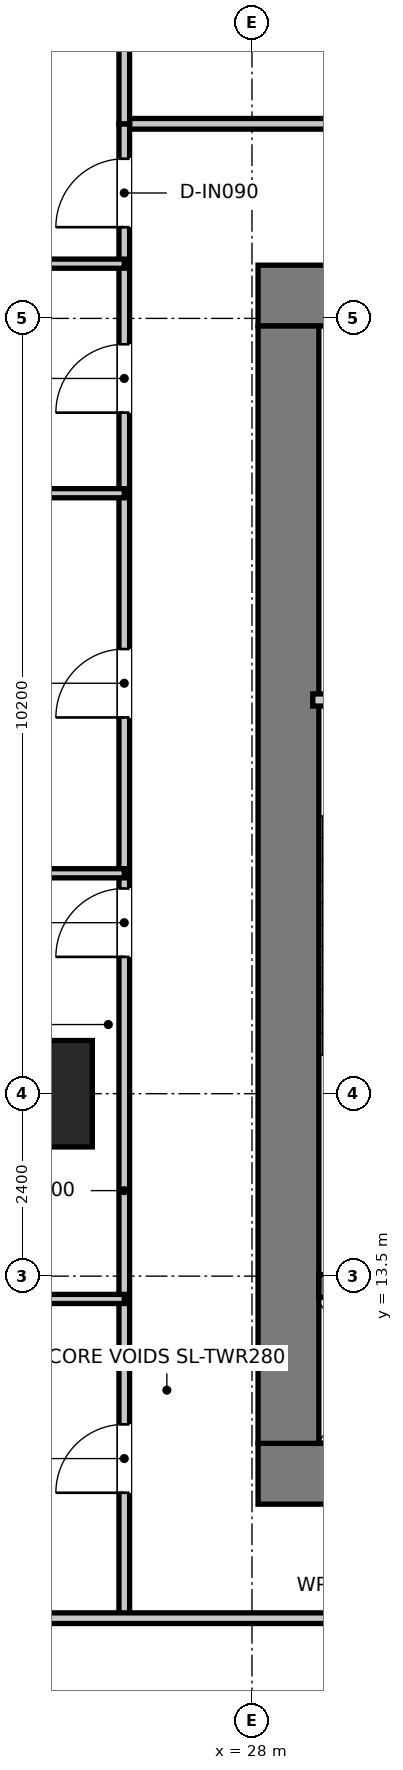
"""IFC4 building model, lengths in metres.
Left out: names, types, materials, properties, quantities, classifications, styles, units other than length and angle.
Written with IfcOpenShell. Run it as: python <this file> out.ifc"""

import sys

from ifc_helpers import new_model, si_unit, direction, frame, frame_2d, origin, origin_2d, place, context, subcontext, project, spatial, rectangle, extrude, source, transform, mapped, element, fill, save


model = new_model("IFC4")
c1 = context("Model", 3, precision=1e-05, world=origin(), true_north=direction((0.0, 1.0)))
c2 = subcontext(c1, "Body", "Model", "MODEL_VIEW")
j1 = project(units=[si_unit("LENGTHUNIT", "METRE"), si_unit("PLANEANGLEUNIT", "RADIAN")], contexts=[c1])
p1 = place(None, origin())
s1 = spatial("IfcSite", under=j1, at=p1, CompositionType="ELEMENT")
p2 = place(p1, origin())
s2 = spatial("IfcBuilding", under=s1, at=p2, CompositionType="ELEMENT")
p3 = place(p2, frame((0.0, 0.0, 295.05)))
s3 = spatial("IfcBuildingStorey", under=s2, at=p3, CompositionType="ELEMENT", Elevation=295.05)
p4 = place(p3, frame((28.08, 10.9, 0.0), z_axis=(0.0, 0.0, 1.0), x_axis=(1.0, 0.0, 0.0)))
e1 = element("IfcWall", 1, at=p4, inside=s3, PredefinedType="SHEAR", context=c2, shape_type="SweptSolid", body=[
    extrude(rectangle(XDim=15.84, YDim=0.8, at=frame_2d((7.92, 0.0))), origin(), (0.0, 0.0, 1.0), 3.95),
])
p5 = place(p3, frame((28.08, 26.4, 0.0), z_axis=(0.0, 0.0, 1.0), x_axis=(1.0, 0.0, 0.0)))
e2 = element("IfcWall", 2, at=p5, inside=s3, PredefinedType="SHEAR", context=c2, shape_type="SweptSolid", body=[
    extrude(rectangle(XDim=15.84, YDim=0.8, at=frame_2d((7.92, 0.0))), origin(), (0.0, 0.0, 1.0), 3.95),
])
p6 = place(p5, frame((7.22, 0.0, 0.0)))
e3 = element("IfcOpeningElement", 3, at=p6, cuts=e2, PredefinedType="OPENING", context=c2, shape_type="SweptSolid", body=[
    extrude(rectangle(XDim=1.4, YDim=2.2, at=frame_2d((0.7, 1.1))), frame((0.0, 0.41, 0.0), z_axis=(0.0, -1.0, 0.0), x_axis=(1.0, 0.0, 0.0)), (0.0, 0.0, 1.0), 0.82),
])
p7 = place(p5, frame((1.775, 0.0, 0.0)))
e4 = element("IfcOpeningElement", 4, at=p7, cuts=e2, PredefinedType="OPENING", context=c2, shape_type="SweptSolid", body=[
    extrude(rectangle(XDim=1.05, YDim=2.1, at=frame_2d((0.525, 1.05))), frame((0.0, 0.41, 0.0), z_axis=(0.0, -1.0, 0.0), x_axis=(1.0, 0.0, 0.0)), (0.0, 0.0, 1.0), 0.82),
])
p8 = place(p5, frame((13.015, 0.0, 0.0)))
e5 = element("IfcOpeningElement", 5, at=p8, cuts=e2, PredefinedType="OPENING", context=c2, shape_type="SweptSolid", body=[
    extrude(rectangle(XDim=1.05, YDim=2.1, at=frame_2d((0.525, 1.05))), frame((0.0, 0.41, 0.0), z_axis=(0.0, -1.0, 0.0), x_axis=(1.0, 0.0, 0.0)), (0.0, 0.0, 1.0), 0.82),
])
p9 = place(p3, frame((28.48, 11.3, 0.0), z_axis=(0.0, 0.0, 1.0), x_axis=(0.0, 1.0, 0.0)))
e6 = element("IfcWall", 6, at=p9, inside=s3, PredefinedType="SHEAR", context=c2, shape_type="SweptSolid", body=[
    extrude(rectangle(XDim=14.7, YDim=0.8, at=frame_2d((7.35, 0.0))), origin(), (0.0, 0.0, 1.0), 3.95),
])
p10 = place(p3, frame((28.88, 13.37, 0.0), z_axis=(0.0, 0.0, 1.0), x_axis=(1.0, 0.0, 0.0)))
e7 = element("IfcWall", 7, at=p10, inside=s3, PredefinedType="SHEAR", context=c2, shape_type="SweptSolid", body=[
    extrude(rectangle(XDim=3.1, YDim=0.3, at=frame_2d((1.55, 0.0))), origin(), (0.0, 0.0, 1.0), 3.95),
])
m1 = source(origin(), c2, "Body", "SweptSolid", [
    extrude(rectangle(XDim=1.4, YDim=1.4, at=origin_2d()), origin(), (0.0, 0.0, 1.0), 3.95),
])
p11 = place(p3, frame((25.2, 15.9, 0.0), z_axis=(0.0, 0.0, 1.0), x_axis=(1.0, 0.0, 0.0)))
e8 = element("IfcColumn", 8, at=p11, inside=s3, PredefinedType="USERDEFINED", context=c2, shape_type="MappedRepresentation", body=[
    mapped(m1, transform((0.0, 0.0, 0.0), x_axis=(1.0, 0.0, 0.0), y_axis=(0.0, 1.0, 0.0), z_axis=(0.0, 0.0, 1.0), scale=1.0)),
])
p12 = place(p3, frame((28.8, 21.08, 0.0), z_axis=(0.0, 0.0, 1.0), x_axis=(1.0, 0.0, 0.0)))
e9 = element("IfcWall", 9, at=p12, inside=s3, PredefinedType="PARTITIONING", context=c2, shape_type="SweptSolid", body=[
    extrude(rectangle(XDim=3.16, YDim=0.16, at=frame_2d((1.58, 0.0))), origin(), (0.0, 0.0, 1.0), 3.67),
])
p13 = place(p12, frame((1.055, 0.0, 0.0)))
e10 = element("IfcOpeningElement", 10, at=p13, cuts=e9, PredefinedType="OPENING", context=c2, shape_type="SweptSolid", body=[
    extrude(rectangle(XDim=1.05, YDim=2.1, at=frame_2d((0.525, 1.05))), frame((0.0, 0.09, 0.0), z_axis=(0.0, -1.0, 0.0), x_axis=(1.0, 0.0, 0.0)), (0.0, 0.0, 1.0), 0.18),
])
p14 = place(p3, frame((26.32, 28.66, 0.0), z_axis=(0.0, 0.0, 1.0), x_axis=(1.0, 0.0, 0.0)))
e11 = element("IfcWall", 11, at=p14, inside=s3, PredefinedType="PARTITIONING", context=c2, shape_type="SweptSolid", body=[
    extrude(rectangle(XDim=19.36, YDim=0.14, at=frame_2d((9.68, 0.0))), origin(), (0.0, 0.0, 1.0), 3.18),
])
p15 = place(p14, frame((4.265, 0.0, 0.0)))
e12 = element("IfcOpeningElement", 12, at=p15, cuts=e11, PredefinedType="OPENING", context=c2, shape_type="SweptSolid", body=[
    extrude(rectangle(XDim=0.95, YDim=2.1, at=frame_2d((0.475, 1.05))), frame((0.0, 0.08, 0.0), z_axis=(0.0, -1.0, 0.0), x_axis=(1.0, 0.0, 0.0)), (0.0, 0.0, 1.0), 0.16),
])
p16 = place(p14, frame((13.945, 0.0, 0.0)))
e13 = element("IfcOpeningElement", 13, at=p16, cuts=e11, PredefinedType="OPENING", context=c2, shape_type="SweptSolid", body=[
    extrude(rectangle(XDim=0.95, YDim=2.1, at=frame_2d((0.475, 1.05))), frame((0.0, 0.08, 0.0), z_axis=(0.0, -1.0, 0.0), x_axis=(1.0, 0.0, 0.0)), (0.0, 0.0, 1.0), 0.16),
])
p17 = place(p3, frame((26.32, 9.0, 0.0), z_axis=(0.0, 0.0, 1.0), x_axis=(0.0, 1.0, 0.0)))
e14 = element("IfcWall", 14, at=p17, inside=s3, PredefinedType="PARTITIONING", context=c2, shape_type="SweptSolid", body=[
    extrude(rectangle(XDim=19.66, YDim=0.14, at=frame_2d((9.83, 0.0))), origin(), (0.0, 0.0, 1.0), 3.13),
])
p18 = place(p17, frame((18.3, 0.0, 0.0)))
e15 = element("IfcOpeningElement", 15, at=p18, cuts=e14, PredefinedType="OPENING", context=c2, shape_type="SweptSolid", body=[
    extrude(rectangle(XDim=0.9, YDim=2.1, at=frame_2d((0.45, 1.05))), frame((0.0, 0.08, 0.0), z_axis=(0.0, -1.0, 0.0), x_axis=(1.0, 0.0, 0.0)), (0.0, 0.0, 1.0), 0.16),
])
p19 = place(p17, frame((1.65, 0.0, 0.0)))
e16 = element("IfcOpeningElement", 16, at=p19, cuts=e14, PredefinedType="OPENING", context=c2, shape_type="SweptSolid", body=[
    extrude(rectangle(XDim=0.9, YDim=2.1, at=frame_2d((0.45, 1.05))), frame((0.0, 0.08, 0.0), z_axis=(0.0, -1.0, 0.0), x_axis=(1.0, 0.0, 0.0)), (0.0, 0.0, 1.0), 0.16),
])
p20 = place(p17, frame((8.7, 0.0, 0.0)))
e17 = element("IfcOpeningElement", 17, at=p20, cuts=e14, PredefinedType="OPENING", context=c2, shape_type="SweptSolid", body=[
    extrude(rectangle(XDim=0.9, YDim=2.1, at=frame_2d((0.45, 1.05))), frame((0.0, 0.08, 0.0), z_axis=(0.0, -1.0, 0.0), x_axis=(1.0, 0.0, 0.0)), (0.0, 0.0, 1.0), 0.16),
])
p21 = place(p17, frame((11.85, 0.0, 0.0)))
e18 = element("IfcOpeningElement", 18, at=p21, cuts=e14, PredefinedType="OPENING", context=c2, shape_type="SweptSolid", body=[
    extrude(rectangle(XDim=0.9, YDim=2.1, at=frame_2d((0.45, 1.05))), frame((0.0, 0.08, 0.0), z_axis=(0.0, -1.0, 0.0), x_axis=(1.0, 0.0, 0.0)), (0.0, 0.0, 1.0), 0.16),
])
p22 = place(p17, frame((15.86, 0.0, 0.0)))
e19 = element("IfcOpeningElement", 19, at=p22, cuts=e14, PredefinedType="OPENING", context=c2, shape_type="SweptSolid", body=[
    extrude(rectangle(XDim=0.9, YDim=2.1, at=frame_2d((0.45, 1.05))), frame((0.0, 0.08, 0.0), z_axis=(0.0, -1.0, 0.0), x_axis=(1.0, 0.0, 0.0)), (0.0, 0.0, 1.0), 0.16),
])
p23 = place(p3, frame((23.783, 9.0, 0.0), z_axis=(0.0, 0.0, 1.0), x_axis=(1.0, 0.0, 0.0)))
e20 = element("IfcWall", 20, at=p23, inside=s3, PredefinedType="PARTITIONING", context=c2, shape_type="SweptSolid", body=[
    extrude(rectangle(XDim=20.609, YDim=0.14, at=frame_2d((10.304, 0.0))), origin(), (0.0, 0.0, 1.0), 3.67),
])
p24 = place(p23, frame((11.767, 0.0, 0.0)))
e21 = element("IfcOpeningElement", 21, at=p24, cuts=e20, PredefinedType="OPENING", context=c2, shape_type="SweptSolid", body=[
    extrude(rectangle(XDim=0.9, YDim=2.1, at=frame_2d((0.45, 1.05))), frame((0.0, 0.08, 0.0), z_axis=(0.0, -1.0, 0.0), x_axis=(1.0, 0.0, 0.0)), (0.0, 0.0, 1.0), 0.16),
])
p25 = place(p3, frame((13.286, 26.82, 0.0), z_axis=(0.0, 0.0, 1.0), x_axis=(1.0, 0.0, 0.0)))
e22 = element("IfcWall", 22, at=p25, inside=s3, PredefinedType="PARTITIONING", context=c2, shape_type="SweptSolid", body=[
    extrude(rectangle(XDim=13.034, YDim=0.12, at=frame_2d((6.517, 0.0))), origin(), (0.0, 0.0, 1.0), 3.13),
])
p26 = place(p3, frame((26.32, 28.66, 0.0), z_axis=(0.0, 0.0, 1.0), x_axis=(0.0, 1.0, 0.0)))
e23 = element("IfcWall", 23, at=p26, inside=s3, PredefinedType="PARTITIONING", context=c2, shape_type="SweptSolid", body=[
    extrude(rectangle(XDim=2.64, YDim=0.14, at=frame_2d((1.32, 0.0))), origin(), (0.0, 0.0, 1.0), 3.43),
])
p27 = place(p3, frame((21.309, 13.2, 0.0), z_axis=(0.0, 0.0, 1.0), x_axis=(1.0, 0.0, 0.0)))
e24 = element("IfcWall", 24, at=p27, inside=s3, PredefinedType="PARTITIONING", context=c2, shape_type="SweptSolid", body=[
    extrude(rectangle(XDim=5.011, YDim=0.12, at=frame_2d((2.505, 0.0))), origin(), (0.0, 0.0, 1.0), 3.18),
])
p28 = place(p3, frame((18.01, 18.8, 0.0), z_axis=(0.0, 0.0, 1.0), x_axis=(1.0, 0.0, 0.0)))
e25 = element("IfcWall", 25, at=p28, inside=s3, PredefinedType="PARTITIONING", context=c2, shape_type="SweptSolid", body=[
    extrude(rectangle(XDim=8.31, YDim=0.12, at=frame_2d((4.155, 0.0))), origin(), (0.0, 0.0, 1.0), 3.13),
])
p29 = place(p3, frame((15.065, 23.8, 0.0), z_axis=(0.0, 0.0, 1.0), x_axis=(1.0, 0.0, 0.0)))
e26 = element("IfcWall", 26, at=p29, inside=s3, PredefinedType="PARTITIONING", context=c2, shape_type="SweptSolid", body=[
    extrude(rectangle(XDim=11.255, YDim=0.12, at=frame_2d((5.627, 0.0))), origin(), (0.0, 0.0, 1.0), 3.13),
])
p30 = place(p18, origin())
e27 = element("IfcDoor", 27, at=p30, inside=s3, OperationType="SINGLE_SWING_LEFT", PredefinedType="DOOR", context=c2, shape_type="SweptSolid", body=[
    extrude(rectangle(XDim=0.9, YDim=2.1, at=frame_2d((0.45, 1.05))), frame((0.0, 0.025, 0.0), z_axis=(0.0, -1.0, 0.0), x_axis=(1.0, 0.0, 0.0)), (0.0, 0.0, 1.0), 0.05),
])
fill(e15, e27)
p31 = place(p19, origin())
e28 = element("IfcDoor", 28, at=p31, inside=s3, OperationType="SINGLE_SWING_LEFT", PredefinedType="DOOR", context=c2, shape_type="SweptSolid", body=[
    extrude(rectangle(XDim=0.9, YDim=2.1, at=frame_2d((0.45, 1.05))), frame((0.0, 0.025, 0.0), z_axis=(0.0, -1.0, 0.0), x_axis=(1.0, 0.0, 0.0)), (0.0, 0.0, 1.0), 0.05),
])
fill(e16, e28)
p32 = place(p20, origin())
e29 = element("IfcDoor", 29, at=p32, inside=s3, OperationType="SINGLE_SWING_LEFT", PredefinedType="DOOR", context=c2, shape_type="SweptSolid", body=[
    extrude(rectangle(XDim=0.9, YDim=2.1, at=frame_2d((0.45, 1.05))), frame((0.0, 0.025, 0.0), z_axis=(0.0, -1.0, 0.0), x_axis=(1.0, 0.0, 0.0)), (0.0, 0.0, 1.0), 0.05),
])
fill(e17, e29)
p33 = place(p21, origin())
e30 = element("IfcDoor", 30, at=p33, inside=s3, OperationType="SINGLE_SWING_LEFT", PredefinedType="DOOR", context=c2, shape_type="SweptSolid", body=[
    extrude(rectangle(XDim=0.9, YDim=2.1, at=frame_2d((0.45, 1.05))), frame((0.0, 0.025, 0.0), z_axis=(0.0, -1.0, 0.0), x_axis=(1.0, 0.0, 0.0)), (0.0, 0.0, 1.0), 0.05),
])
fill(e18, e30)
p34 = place(p22, origin())
e31 = element("IfcDoor", 31, at=p34, inside=s3, OperationType="SINGLE_SWING_LEFT", PredefinedType="DOOR", context=c2, shape_type="SweptSolid", body=[
    extrude(rectangle(XDim=0.9, YDim=2.1, at=frame_2d((0.45, 1.05))), frame((0.0, 0.025, 0.0), z_axis=(0.0, -1.0, 0.0), x_axis=(1.0, 0.0, 0.0)), (0.0, 0.0, 1.0), 0.05),
])
fill(e19, e31)
save(model, sys.argv[1])
